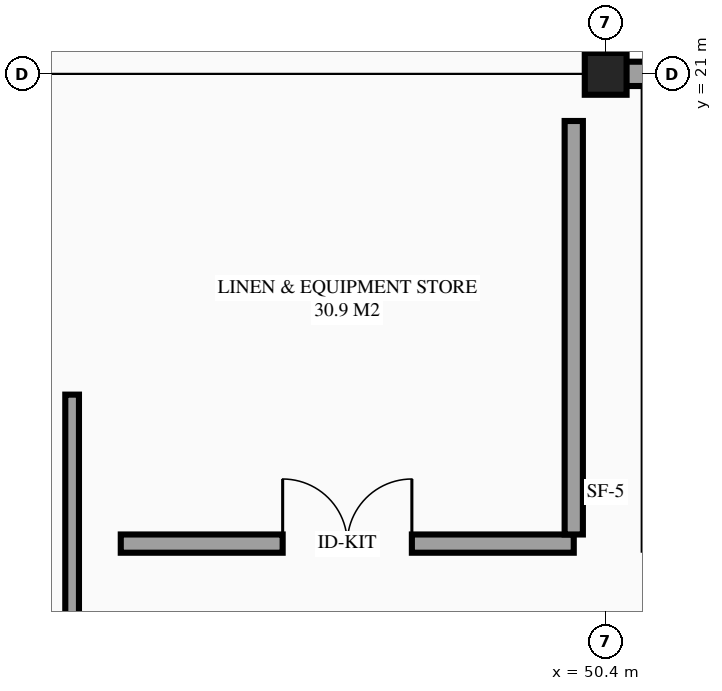
"""IFC4 building model, lengths in metres.
Left out: names, types, materials, properties, quantities, classifications, styles, units other than length and angle.
Written with IfcOpenShell. Run it as: python <this file> out.ifc"""

import sys

from ifc_helpers import new_model, si_unit, direction, frame, frame_2d, origin, origin_2d, place, context, subcontext, project, spatial, rectangle, extrude, element, fill, save


model = new_model("IFC4")
c1 = context("Model", 3, precision=1e-05, world=origin(), true_north=direction((0.0, 1.0)))
c2 = subcontext(c1, "Body", "Model", "MODEL_VIEW")
j1 = project(units=[si_unit("LENGTHUNIT", "METRE"), si_unit("PLANEANGLEUNIT", "RADIAN")], contexts=[c1])
p1 = place(None, origin())
s1 = spatial("IfcSite", under=j1, at=p1, CompositionType="ELEMENT")
p2 = place(p1, origin())
s2 = spatial("IfcBuilding", under=s1, at=p2, CompositionType="ELEMENT")
p3 = place(p2, frame((0.0, 0.0, 36.3)))
s3 = spatial("IfcBuildingStorey", under=s2, at=p3, CompositionType="ELEMENT", Elevation=36.3)
p4 = place(p3, frame((50.4, 21.0, 0.0), z_axis=(0.0, 0.0, 1.0), x_axis=(1.0, 0.0, 0.0)))
e1 = element("IfcColumn", 1, at=p4, inside=s3, PredefinedType="COLUMN", context=c2, shape_type="SweptSolid", body=[
    extrude(rectangle(XDim=0.55, YDim=0.55, at=origin_2d()), origin(), (0.0, 0.0, 1.0), 3.6),
])
p5 = place(p3, frame((43.38, 12.91, 0.0), z_axis=(0.0, 0.0, 1.0), x_axis=(0.0, 1.0, 0.0)))
e2 = element("IfcWall", 2, at=p5, inside=s3, PredefinedType="PARTITIONING", context=c2, shape_type="SweptSolid", body=[
    extrude(rectangle(XDim=3.87, YDim=0.18, at=frame_2d((1.935, 0.0))), origin(), (0.0, 0.0, 1.0), 3.375),
])
p6 = place(p3, frame((44.02, 14.82, 0.0), z_axis=(0.0, 0.0, 1.0), x_axis=(1.0, 0.0, 0.0)))
e3 = element("IfcWall", 3, at=p6, inside=s3, PredefinedType="PARTITIONING", context=c2, shape_type="SweptSolid", body=[
    extrude(rectangle(XDim=5.96, YDim=0.24, at=frame_2d((2.98, 0.0))), origin(), (0.0, 0.0, 1.0), 3.375),
])
p7 = place(p6, frame((2.13, 0.0, 0.0)))
e4 = element("IfcOpeningElement", 4, at=p7, cuts=e3, PredefinedType="OPENING", context=c2, shape_type="SweptSolid", body=[
    extrude(rectangle(XDim=1.7, YDim=2.2, at=frame_2d((0.85, 1.1))), frame((0.0, 0.13, 0.0), z_axis=(0.0, -1.0, 0.0), x_axis=(1.0, 0.0, 0.0)), (0.0, 0.0, 1.0), 0.26),
])
p8 = place(p3, frame((49.98, 14.94, 0.0), z_axis=(0.0, 0.0, 1.0), x_axis=(0.0, 1.0, 0.0)))
e5 = element("IfcWall", 5, at=p8, inside=s3, PredefinedType="PARTITIONING", context=c2, shape_type="SweptSolid", body=[
    extrude(rectangle(XDim=5.44, YDim=0.24, at=frame_2d((2.72, 0.0))), origin(), (0.0, 0.0, 1.0), 3.375),
])
p9 = place(p3, frame((58.8, 21.0, 0.0), z_axis=(0.0, 0.0, 1.0), x_axis=(-1.0, 0.0, 0.0)))
e6 = element("IfcWall", 6, at=p9, inside=s3, PredefinedType="STANDARD", context=c2, shape_type="SweptSolid", body=[
    extrude(rectangle(XDim=8.4, YDim=0.32, at=frame_2d((4.2, 0.0))), origin(), (0.0, 0.0, 1.0), 2.63),
])
p10 = place(p9, frame((3.3, 0.0, 0.75)))
e7 = element("IfcOpeningElement", 7, at=p10, cuts=e6, PredefinedType="OPENING", context=c2, shape_type="SweptSolid", body=[
    extrude(rectangle(XDim=1.8, YDim=1.5, at=frame_2d((0.9, 0.75))), frame((0.0, 0.17, 0.0), z_axis=(0.0, -1.0, 0.0), x_axis=(1.0, 0.0, 0.0)), (0.0, 0.0, 1.0), 0.34),
])
p11 = place(p3, frame((50.4, 21.0, 0.0), z_axis=(0.0, 0.0, 1.0), x_axis=(0.0, 1.0, 0.0)))
e8 = element("IfcWall", 8, at=p11, inside=s3, PredefinedType="STANDARD", context=c2, shape_type="SweptSolid", body=[
    extrude(rectangle(XDim=16.8, YDim=0.32, at=frame_2d((8.4, 0.0))), origin(), (0.0, 0.0, 1.0), 2.78),
])
p12 = place(p11, frame((2.4, 0.0, 0.85)))
e9 = element("IfcOpeningElement", 9, at=p12, cuts=e8, PredefinedType="OPENING", context=c2, shape_type="SweptSolid", body=[
    extrude(rectangle(XDim=1.5, YDim=1.5, at=frame_2d((0.75, 0.75))), frame((0.0, 0.17, 0.0), z_axis=(0.0, -1.0, 0.0), x_axis=(1.0, 0.0, 0.0)), (0.0, 0.0, 1.0), 0.34),
])
p13 = place(p11, frame((9.15, 0.0, 0.85)))
e10 = element("IfcOpeningElement", 10, at=p13, cuts=e8, PredefinedType="OPENING", context=c2, shape_type="SweptSolid", body=[
    extrude(rectangle(XDim=1.5, YDim=1.5, at=frame_2d((0.75, 0.75))), frame((0.0, 0.17, 0.0), z_axis=(0.0, -1.0, 0.0), x_axis=(1.0, 0.0, 0.0)), (0.0, 0.0, 1.0), 0.34),
])
p14 = place(p7, origin())
e11 = element("IfcDoor", 11, at=p14, inside=s3, OperationType="DOUBLE_DOOR_SINGLE_SWING", PredefinedType="DOOR", context=c2, shape_type="SweptSolid", body=[
    extrude(rectangle(XDim=1.7, YDim=2.2, at=frame_2d((0.85, 1.1))), frame((0.0, 0.025, 0.0), z_axis=(0.0, -1.0, 0.0), x_axis=(1.0, 0.0, 0.0)), (0.0, 0.0, 1.0), 0.05),
])
fill(e4, e11)
save(model, sys.argv[1])
